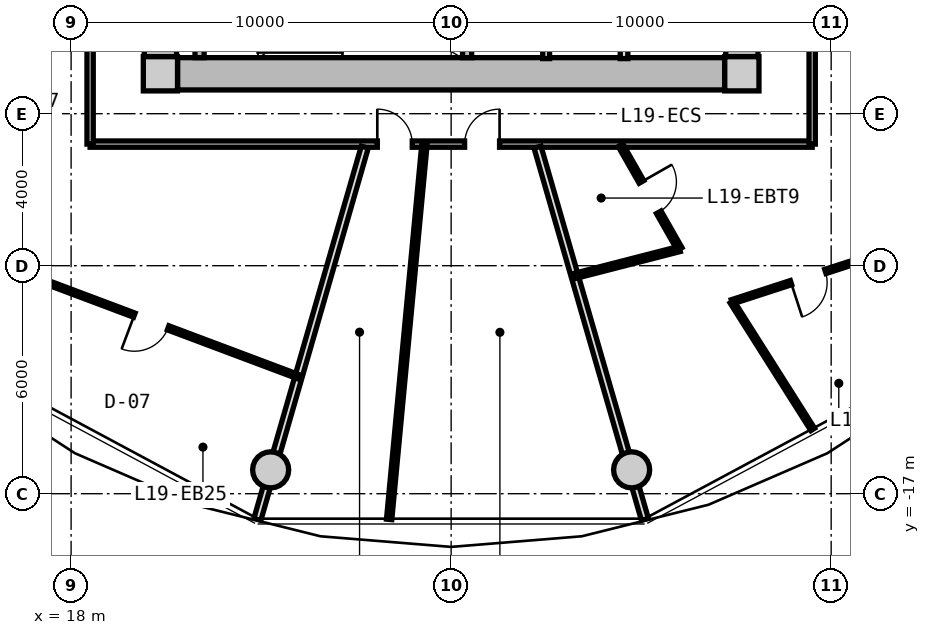
"""IFC4 building model, lengths in metres.
Left out: names, types, materials, properties, quantities, classifications, styles, units other than length and angle.
Written with IfcOpenShell. Run it as: python <this file> out.ifc"""

import sys

from ifc_helpers import new_model, si_unit, direction, frame, frame_2d, origin, origin_2d, place, context, subcontext, project, spatial, rectangle, circle, extrude, source, transform, mapped, element, fill, save


model = new_model("IFC4")
c1 = context("Model", 3, precision=1e-05, world=origin(), true_north=direction((0.0, 1.0)))
c2 = subcontext(c1, "Body", "Model", "MODEL_VIEW")
j1 = project(units=[si_unit("LENGTHUNIT", "METRE"), si_unit("PLANEANGLEUNIT", "RADIAN")], contexts=[c1])
p1 = place(None, origin())
s1 = spatial("IfcSite", under=j1, at=p1, CompositionType="ELEMENT")
p2 = place(p1, origin())
s2 = spatial("IfcBuilding", under=s1, at=p2, CompositionType="ELEMENT")
p3 = place(p2, frame((0.0, 0.0, 64.3)))
s3 = spatial("IfcBuildingStorey", under=s2, at=p3, CompositionType="ELEMENT", Elevation=64.3)
m1 = source(origin(), c2, "Body", "SweptSolid", [
    extrude(rectangle(XDim=0.9, YDim=0.9, at=origin_2d()), origin(), (0.0, 0.0, 1.0), 3.05),
])
for number, where, z_axis, x_axis in (
    (1, (20.35, -5.95, 0.0), (0.0, 0.0, 1.0), (1.0, 0.0, 0.0)),
    (2, (35.65, -5.95, 0.0), (0.0, 0.0, 1.0), (1.0, 0.0, 0.0)),
):
    element("IfcColumn", number, at=place(p3, frame(where, z_axis=z_axis, x_axis=x_axis)), inside=s3, PredefinedType="COLUMN", context=c2, shape_type="MappedRepresentation", body=[
        mapped(m1, transform((0.0, 0.0, 0.0), x_axis=(1.0, 0.0, 0.0), y_axis=(0.0, 1.0, 0.0), z_axis=(0.0, 0.0, 1.0), scale=1.0)),
    ])
m2 = source(origin(), c2, "Body", "SweptSolid", [
    extrude(rectangle(XDim=14.4, YDim=0.85, at=frame_2d((7.2, 0.0))), origin(), (0.0, 0.0, 1.0), 2.79),
])
p4 = place(p3, frame((35.2, -5.95, 0.0), z_axis=(0.0, 0.0, 1.0), x_axis=(-1.0, 0.0, 0.0)))
e3 = element("IfcWall", 3, at=p4, inside=s3, PredefinedType="SHEAR", context=c2, shape_type="MappedRepresentation", body=[
    mapped(m2, transform((0.0, 0.0, 0.0), x_axis=(1.0, 0.0, 0.0), y_axis=(0.0, 1.0, 0.0), z_axis=(0.0, 0.0, 1.0), scale=1.0)),
])
m3 = source(origin(), c2, "Body", "SweptSolid", [
    extrude(rectangle(XDim=11.0, YDim=0.85, at=frame_2d((5.5, 0.0))), origin(), (0.0, 0.0, 1.0), 2.79),
])
p5 = place(p3, frame((20.35, -5.5, 0.0), z_axis=(0.0, 0.0, 1.0), x_axis=(0.0, 1.0, 0.0)))
e4 = element("IfcWall", 4, at=p5, inside=s3, PredefinedType="SHEAR", context=c2, shape_type="MappedRepresentation", body=[
    mapped(m3, transform((0.0, 0.0, 0.0), x_axis=(1.0, 0.0, 0.0), y_axis=(0.0, 1.0, 0.0), z_axis=(0.0, 0.0, 1.0), scale=1.0)),
])
p6 = place(p5, frame((3.8, 0.0, 0.0)))
e5 = element("IfcOpeningElement", 5, at=p6, cuts=e4, PredefinedType="OPENING", context=c2, shape_type="SweptSolid", body=[
    extrude(rectangle(XDim=1.2, YDim=2.15, at=frame_2d((0.6, 1.075))), frame((0.0, 0.435, 0.0), z_axis=(0.0, -1.0, 0.0), x_axis=(1.0, 0.0, 0.0)), (0.0, 0.0, 1.0), 0.87),
])
p7 = place(p3, frame((35.65, 5.5, 0.0), z_axis=(0.0, 0.0, 1.0), x_axis=(0.0, -1.0, 0.0)))
e6 = element("IfcWall", 6, at=p7, inside=s3, PredefinedType="SHEAR", context=c2, shape_type="MappedRepresentation", body=[
    mapped(m3, transform((0.0, 0.0, 0.0), x_axis=(1.0, 0.0, 0.0), y_axis=(0.0, 1.0, 0.0), z_axis=(0.0, 0.0, 1.0), scale=1.0)),
])
p8 = place(p7, frame((5.65, 0.0, 0.0)))
e7 = element("IfcOpeningElement", 7, at=p8, cuts=e6, PredefinedType="OPENING", context=c2, shape_type="SweptSolid", body=[
    extrude(rectangle(XDim=1.2, YDim=2.15, at=frame_2d((0.6, 1.075))), frame((0.0, 0.435, 0.0), z_axis=(0.0, -1.0, 0.0), x_axis=(1.0, 0.0, 0.0)), (0.0, 0.0, 1.0), 0.87),
])
m4 = source(origin(), c2, "Body", "SweptSolid", [
    extrude(circle(Radius=0.475, at=origin_2d()), origin(), (0.0, 0.0, 1.0), 3.05),
])
for number, where, z_axis, x_axis in (
    (8, (23.251, -16.373, 0.0), (0.0, 0.0, 1.0), (1.0, 0.0, 0.0)),
    (9, (32.749, -16.373, 0.0), (0.0, 0.0, 1.0), (1.0, 0.0, 0.0)),
):
    element("IfcColumn", number, at=place(p3, frame(where, z_axis=z_axis, x_axis=x_axis)), inside=s3, PredefinedType="COLUMN", context=c2, shape_type="MappedRepresentation", body=[
        mapped(m4, transform((0.0, 0.0, 0.0), x_axis=(1.0, 0.0, 0.0), y_axis=(0.0, 1.0, 0.0), z_axis=(0.0, 0.0, 1.0), scale=1.0)),
    ])
m5 = source(origin(), c2, "Body", "SweptSolid", [
    extrude(rectangle(XDim=3.075, YDim=0.24, at=frame_2d((1.538, 0.0))), origin(), (0.0, 0.0, 1.0), 2.79),
])
for number, where, z_axis, x_axis in (
    (10, (21.38, -5.525, 0.0), (0.0, 0.0, 1.0), (0.0, 1.0, 0.0)),
    (11, (28.42, -5.525, 0.0), (0.0, 0.0, 1.0), (0.0, 1.0, 0.0)),
):
    element("IfcWall", number, at=place(p3, frame(where, z_axis=z_axis, x_axis=x_axis)), inside=s3, PredefinedType="PARTITIONING", context=c2, shape_type="MappedRepresentation", body=[
        mapped(m5, transform((0.0, 0.0, 0.0), x_axis=(1.0, 0.0, 0.0), y_axis=(0.0, 1.0, 0.0), z_axis=(0.0, 0.0, 1.0), scale=1.0)),
    ])
m6 = source(origin(), c2, "Body", "SweptSolid", [
    extrude(rectangle(XDim=3.8, YDim=0.2, at=frame_2d((1.9, 0.0))), origin(), (0.0, 0.0, 1.0), 2.775),
])
p9 = place(p3, frame((32.55, -5.55, 0.0), z_axis=(0.0, 0.0, 1.0), x_axis=(0.0, 1.0, 0.0)))
e12 = element("IfcWall", 12, at=p9, inside=s3, PredefinedType="PARTITIONING", context=c2, shape_type="MappedRepresentation", body=[
    mapped(m6, transform((0.0, 0.0, 0.0), x_axis=(1.0, 0.0, 0.0), y_axis=(0.0, 1.0, 0.0), z_axis=(0.0, 0.0, 1.0), scale=1.0)),
])
m7 = source(origin(), c2, "Body", "SweptSolid", [
    extrude(rectangle(XDim=3.22, YDim=0.18, at=frame_2d((1.61, 0.0))), origin(), (0.0, 0.0, 1.0), 2.775),
])
p10 = place(p3, frame((30.5, -5.55, 0.0), z_axis=(0.0, 0.0, 1.0), x_axis=(0.0, 1.0, 0.0)))
e13 = element("IfcWall", 13, at=p10, inside=s3, PredefinedType="PARTITIONING", context=c2, shape_type="MappedRepresentation", body=[
    mapped(m7, transform((0.0, 0.0, 0.0), x_axis=(1.0, 0.0, 0.0), y_axis=(0.0, 1.0, 0.0), z_axis=(0.0, 0.0, 1.0), scale=1.0)),
])
m8 = source(origin(), c2, "Body", "SweptSolid", [
    extrude(rectangle(XDim=19.0, YDim=0.165, at=frame_2d((9.5, 0.0))), origin(), (0.0, 0.0, 1.0), 2.775),
])
p11 = place(p3, frame((37.5, -7.8, 0.0), z_axis=(0.0, 0.0, 1.0), x_axis=(-1.0, 0.0, 0.0)))
e14 = element("IfcWall", 14, at=p11, inside=s3, PredefinedType="PARTITIONING", context=c2, shape_type="MappedRepresentation", body=[
    mapped(m8, transform((0.0, 0.0, 0.0), x_axis=(1.0, 0.0, 0.0), y_axis=(0.0, 1.0, 0.0), z_axis=(0.0, 0.0, 1.0), scale=1.0)),
])
p12 = place(p11, frame((10.523, 0.0, 0.0)))
e15 = element("IfcOpeningElement", 15, at=p12, cuts=e14, PredefinedType="OPENING", context=c2, shape_type="SweptSolid", body=[
    extrude(rectangle(XDim=0.92, YDim=2.1, at=frame_2d((0.46, 1.05))), frame((0.0, 0.093, 0.0), z_axis=(0.0, -1.0, 0.0), x_axis=(1.0, 0.0, 0.0)), (0.0, 0.0, 1.0), 0.185),
])
p13 = place(p11, frame((8.226, 0.0, 0.0)))
e16 = element("IfcOpeningElement", 16, at=p13, cuts=e14, PredefinedType="OPENING", context=c2, shape_type="SweptSolid", body=[
    extrude(rectangle(XDim=0.92, YDim=2.1, at=frame_2d((0.46, 1.05))), frame((0.0, 0.093, 0.0), z_axis=(0.0, -1.0, 0.0), x_axis=(1.0, 0.0, 0.0)), (0.0, 0.0, 1.0), 0.185),
])
m9 = source(origin(), c2, "Body", "SweptSolid", [
    extrude(rectangle(XDim=15.6, YDim=0.165, at=frame_2d((7.8, 0.0))), origin(), (0.0, 0.0, 1.0), 2.775),
])
p14 = place(p3, frame((18.5, -7.8, 0.0), z_axis=(0.0, 0.0, 1.0), x_axis=(0.0, 1.0, 0.0)))
e17 = element("IfcWall", 17, at=p14, inside=s3, PredefinedType="PARTITIONING", context=c2, shape_type="MappedRepresentation", body=[
    mapped(m9, transform((0.0, 0.0, 0.0), x_axis=(1.0, 0.0, 0.0), y_axis=(0.0, 1.0, 0.0), z_axis=(0.0, 0.0, 1.0), scale=1.0)),
])
p15 = place(p14, frame((3.63, 0.0, 0.0)))
e18 = element("IfcOpeningElement", 18, at=p15, cuts=e17, PredefinedType="OPENING", context=c2, shape_type="SweptSolid", body=[
    extrude(rectangle(XDim=1.05, YDim=2.15, at=frame_2d((0.525, 1.075))), frame((0.0, 0.093, 0.0), z_axis=(0.0, -1.0, 0.0), x_axis=(1.0, 0.0, 0.0)), (0.0, 0.0, 1.0), 0.185),
])
p16 = place(p3, frame((37.5, 7.8, 0.0), z_axis=(0.0, 0.0, 1.0), x_axis=(0.0, -1.0, 0.0)))
e19 = element("IfcWall", 19, at=p16, inside=s3, PredefinedType="PARTITIONING", context=c2, shape_type="MappedRepresentation", body=[
    mapped(m9, transform((0.0, 0.0, 0.0), x_axis=(1.0, 0.0, 0.0), y_axis=(0.0, 1.0, 0.0), z_axis=(0.0, 0.0, 1.0), scale=1.0)),
])
p17 = place(p16, frame((7.275, 0.0, 0.0)))
e20 = element("IfcOpeningElement", 20, at=p17, cuts=e19, PredefinedType="OPENING", context=c2, shape_type="SweptSolid", body=[
    extrude(rectangle(XDim=1.05, YDim=2.15, at=frame_2d((0.525, 1.075))), frame((0.0, 0.093, 0.0), z_axis=(0.0, -1.0, 0.0), x_axis=(1.0, 0.0, 0.0)), (0.0, 0.0, 1.0), 0.185),
])
m10 = source(origin(), c2, "Body", "SweptSolid", [
    extrude(rectangle(XDim=10.196, YDim=0.19, at=frame_2d((5.098, 0.0))), origin(), (0.0, 0.0, 1.0), 2.225),
])
p18 = place(p3, frame((25.727, -7.88, 0.0), z_axis=(0.0, 0.0, 1.0), x_axis=(-0.277136420347, -0.960830580549, 0.0)))
e21 = element("IfcWall", 21, at=p18, inside=s3, PredefinedType="PARTITIONING", context=c2, shape_type="MappedRepresentation", body=[
    mapped(m10, transform((0.0, 0.0, 0.0), x_axis=(1.0, 0.0, 0.0), y_axis=(0.0, 1.0, 0.0), z_axis=(0.0, 0.0, 1.0), scale=1.0)),
])
m11 = source(origin(), c2, "Body", "SweptSolid", [
    extrude(rectangle(XDim=8.32, YDim=0.115, at=frame_2d((4.16, 0.0))), origin(), (0.0, 0.0, 1.0), 2.775),
])
p19 = place(p3, frame((16.214, -11.006, 0.0), z_axis=(0.0, 0.0, 1.0), x_axis=(0.936180763098, -0.351518959382, 0.0)))
e22 = element("IfcWall", 22, at=p19, inside=s3, PredefinedType="PARTITIONING", context=c2, shape_type="MappedRepresentation", body=[
    mapped(m11, transform((0.0, 0.0, 0.0), x_axis=(1.0, 0.0, 0.0), y_axis=(0.0, 1.0, 0.0), z_axis=(0.0, 0.0, 1.0), scale=1.0)),
])
p20 = place(p19, frame((3.685, 0.0, 0.0)))
e23 = element("IfcOpeningElement", 23, at=p20, cuts=e22, PredefinedType="OPENING", context=c2, shape_type="SweptSolid", body=[
    extrude(rectangle(XDim=0.95, YDim=2.1, at=frame_2d((0.475, 1.05))), frame((0.0, 0.067, 0.0), z_axis=(0.0, -1.0, 0.0), x_axis=(1.0, 0.0, 0.0)), (0.0, 0.0, 1.0), 0.135),
])
p21 = place(p3, frame((30.273, -7.88, 0.0), z_axis=(0.0, 0.0, 1.0), x_axis=(0.277136420347, -0.960830580549, 0.0)))
e24 = element("IfcWall", 24, at=p21, inside=s3, PredefinedType="PARTITIONING", context=c2, shape_type="MappedRepresentation", body=[
    mapped(m10, transform((0.0, 0.0, 0.0), x_axis=(1.0, 0.0, 0.0), y_axis=(0.0, 1.0, 0.0), z_axis=(0.0, 0.0, 1.0), scale=1.0)),
])
m12 = source(origin(), c2, "Body", "SweptSolid", [
    extrude(rectangle(XDim=9.89, YDim=0.14, at=frame_2d((4.945, 0.0))), origin(), (0.0, 0.0, 1.0), 2.775),
])
p22 = place(p3, frame((27.296, -7.83, 0.0), z_axis=(0.0, 0.0, 1.0), x_axis=(-0.093780403478, -0.995592906726, 0.0)))
e25 = element("IfcWall", 25, at=p22, inside=s3, PredefinedType="PARTITIONING", context=c2, shape_type="MappedRepresentation", body=[
    mapped(m12, transform((0.0, 0.0, 0.0), x_axis=(1.0, 0.0, 0.0), y_axis=(0.0, 1.0, 0.0), z_axis=(0.0, 0.0, 1.0), scale=1.0)),
])
m13 = source(origin(), c2, "Body", "SweptSolid", [
    extrude(rectangle(XDim=3.141, YDim=0.14, at=frame_2d((1.571, 0.0))), origin(), (0.0, 0.0, 1.0), 2.775),
])
p23 = place(p3, frame((32.458, -7.83, 0.0), z_axis=(0.0, 0.0, 1.0), x_axis=(0.494874486088, -0.868964465913, 0.0)))
e26 = element("IfcWall", 26, at=p23, inside=s3, PredefinedType="PARTITIONING", context=c2, shape_type="MappedRepresentation", body=[
    mapped(m13, transform((0.0, 0.0, 0.0), x_axis=(1.0, 0.0, 0.0), y_axis=(0.0, 1.0, 0.0), z_axis=(0.0, 0.0, 1.0), scale=1.0)),
])
p24 = place(p23, frame((1.111, 0.0, 0.0)))
e27 = element("IfcOpeningElement", 27, at=p24, cuts=e26, PredefinedType="OPENING", context=c2, shape_type="SweptSolid", body=[
    extrude(rectangle(XDim=0.92, YDim=2.1, at=frame_2d((0.46, 1.05))), frame((0.0, 0.08, 0.0), z_axis=(0.0, -1.0, 0.0), x_axis=(1.0, 0.0, 0.0)), (0.0, 0.0, 1.0), 0.16),
])
m14 = source(origin(), c2, "Body", "SweptSolid", [
    extrude(rectangle(XDim=2.868, YDim=0.14, at=frame_2d((1.434, 0.0))), origin(), (0.0, 0.0, 1.0), 2.775),
])
p25 = place(p3, frame((34.013, -10.56, 0.0), z_axis=(0.0, 0.0, 1.0), x_axis=(-0.968467705195, -0.249139125778, 0.0)))
e28 = element("IfcWall", 28, at=p25, inside=s3, PredefinedType="PARTITIONING", context=c2, shape_type="MappedRepresentation", body=[
    mapped(m14, transform((0.0, 0.0, 0.0), x_axis=(1.0, 0.0, 0.0), y_axis=(0.0, 1.0, 0.0), z_axis=(0.0, 0.0, 1.0), scale=1.0)),
])
m15 = source(origin(), c2, "Body", "SweptSolid", [
    extrude(rectangle(XDim=3.974, YDim=0.115, at=frame_2d((1.987, 0.0))), origin(), (0.0, 0.0, 1.0), 2.775),
])
p26 = place(p3, frame((35.389, -11.95, 0.0), z_axis=(0.0, 0.0, 1.0), x_axis=(0.534810918023, -0.844971764003, 0.0)))
e29 = element("IfcWall", 29, at=p26, inside=s3, PredefinedType="PARTITIONING", context=c2, shape_type="MappedRepresentation", body=[
    mapped(m15, transform((0.0, 0.0, 0.0), x_axis=(1.0, 0.0, 0.0), y_axis=(0.0, 1.0, 0.0), z_axis=(0.0, 0.0, 1.0), scale=1.0)),
])
m16 = source(origin(), c2, "Body", "SweptSolid", [
    extrude(rectangle(XDim=4.22, YDim=0.115, at=frame_2d((2.11, 0.0))), origin(), (0.0, 0.0, 1.0), 2.775),
])
p27 = place(p3, frame((35.389, -11.95, 0.0), z_axis=(0.0, 0.0, 1.0), x_axis=(0.951130539873, 0.308789080315, 0.0)))
e30 = element("IfcWall", 30, at=p27, inside=s3, PredefinedType="PARTITIONING", context=c2, shape_type="MappedRepresentation", body=[
    mapped(m16, transform((0.0, 0.0, 0.0), x_axis=(1.0, 0.0, 0.0), y_axis=(0.0, 1.0, 0.0), z_axis=(0.0, 0.0, 1.0), scale=1.0)),
])
p28 = place(p27, frame((1.635, 0.0, 0.0)))
e31 = element("IfcOpeningElement", 31, at=p28, cuts=e30, PredefinedType="OPENING", context=c2, shape_type="SweptSolid", body=[
    extrude(rectangle(XDim=0.95, YDim=2.1, at=frame_2d((0.475, 1.05))), frame((0.0, 0.067, 0.0), z_axis=(0.0, -1.0, 0.0), x_axis=(1.0, 0.0, 0.0)), (0.0, 0.0, 1.0), 0.135),
])
m17 = source(origin(), c2, "Body", "SweptSolid", [
    extrude(rectangle(XDim=0.95, YDim=2.1, at=frame_2d((0.475, 1.05))), frame((0.0, 0.025, 0.0), z_axis=(0.0, -1.0, 0.0), x_axis=(1.0, 0.0, 0.0)), (0.0, 0.0, 1.0), 0.05),
])
p29 = place(p20, frame((0.95, 0.0, 0.0), z_axis=(0.0, 0.0, 1.0), x_axis=(-1.0, 0.0, 0.0)))
e32 = element("IfcDoor", 32, at=p29, inside=s3, OperationType="SINGLE_SWING_RIGHT", PredefinedType="DOOR", context=c2, shape_type="MappedRepresentation", body=[
    mapped(m17, transform((0.0, 0.0, 0.0), x_axis=(1.0, 0.0, 0.0), y_axis=(0.0, 1.0, 0.0), z_axis=(0.0, 0.0, 1.0), scale=1.0)),
])
fill(e23, e32)
m18 = source(origin(), c2, "Body", "SweptSolid", [
    extrude(rectangle(XDim=0.92, YDim=2.1, at=frame_2d((0.46, 1.05))), frame((0.0, 0.025, 0.0), z_axis=(0.0, -1.0, 0.0), x_axis=(1.0, 0.0, 0.0)), (0.0, 0.0, 1.0), 0.05),
])
p30 = place(p12, frame((0.92, 0.0, 0.0), z_axis=(0.0, 0.0, 1.0), x_axis=(-1.0, 0.0, 0.0)))
e33 = element("IfcDoor", 33, at=p30, inside=s3, OperationType="SINGLE_SWING_LEFT", PredefinedType="DOOR", context=c2, shape_type="MappedRepresentation", body=[
    mapped(m18, transform((0.0, 0.0, 0.0), x_axis=(1.0, 0.0, 0.0), y_axis=(0.0, 1.0, 0.0), z_axis=(0.0, 0.0, 1.0), scale=1.0)),
])
fill(e15, e33)
p31 = place(p13, frame((0.92, 0.0, 0.0), z_axis=(0.0, 0.0, 1.0), x_axis=(-1.0, 0.0, 0.0)))
e34 = element("IfcDoor", 34, at=p31, inside=s3, OperationType="SINGLE_SWING_RIGHT", PredefinedType="DOOR", context=c2, shape_type="MappedRepresentation", body=[
    mapped(m18, transform((0.0, 0.0, 0.0), x_axis=(1.0, 0.0, 0.0), y_axis=(0.0, 1.0, 0.0), z_axis=(0.0, 0.0, 1.0), scale=1.0)),
])
fill(e16, e34)
p32 = place(p24, origin())
e35 = element("IfcDoor", 35, at=p32, inside=s3, OperationType="SINGLE_SWING_LEFT", PredefinedType="DOOR", context=c2, shape_type="MappedRepresentation", body=[
    mapped(m18, transform((0.0, 0.0, 0.0), x_axis=(1.0, 0.0, 0.0), y_axis=(0.0, 1.0, 0.0), z_axis=(0.0, 0.0, 1.0), scale=1.0)),
])
fill(e27, e35)
p33 = place(p28, frame((0.95, 0.0, 0.0), z_axis=(0.0, 0.0, 1.0), x_axis=(-1.0, 0.0, 0.0)))
e36 = element("IfcDoor", 36, at=p33, inside=s3, OperationType="SINGLE_SWING_RIGHT", PredefinedType="DOOR", context=c2, shape_type="MappedRepresentation", body=[
    mapped(m17, transform((0.0, 0.0, 0.0), x_axis=(1.0, 0.0, 0.0), y_axis=(0.0, 1.0, 0.0), z_axis=(0.0, 0.0, 1.0), scale=1.0)),
])
fill(e31, e36)
save(model, sys.argv[1])
